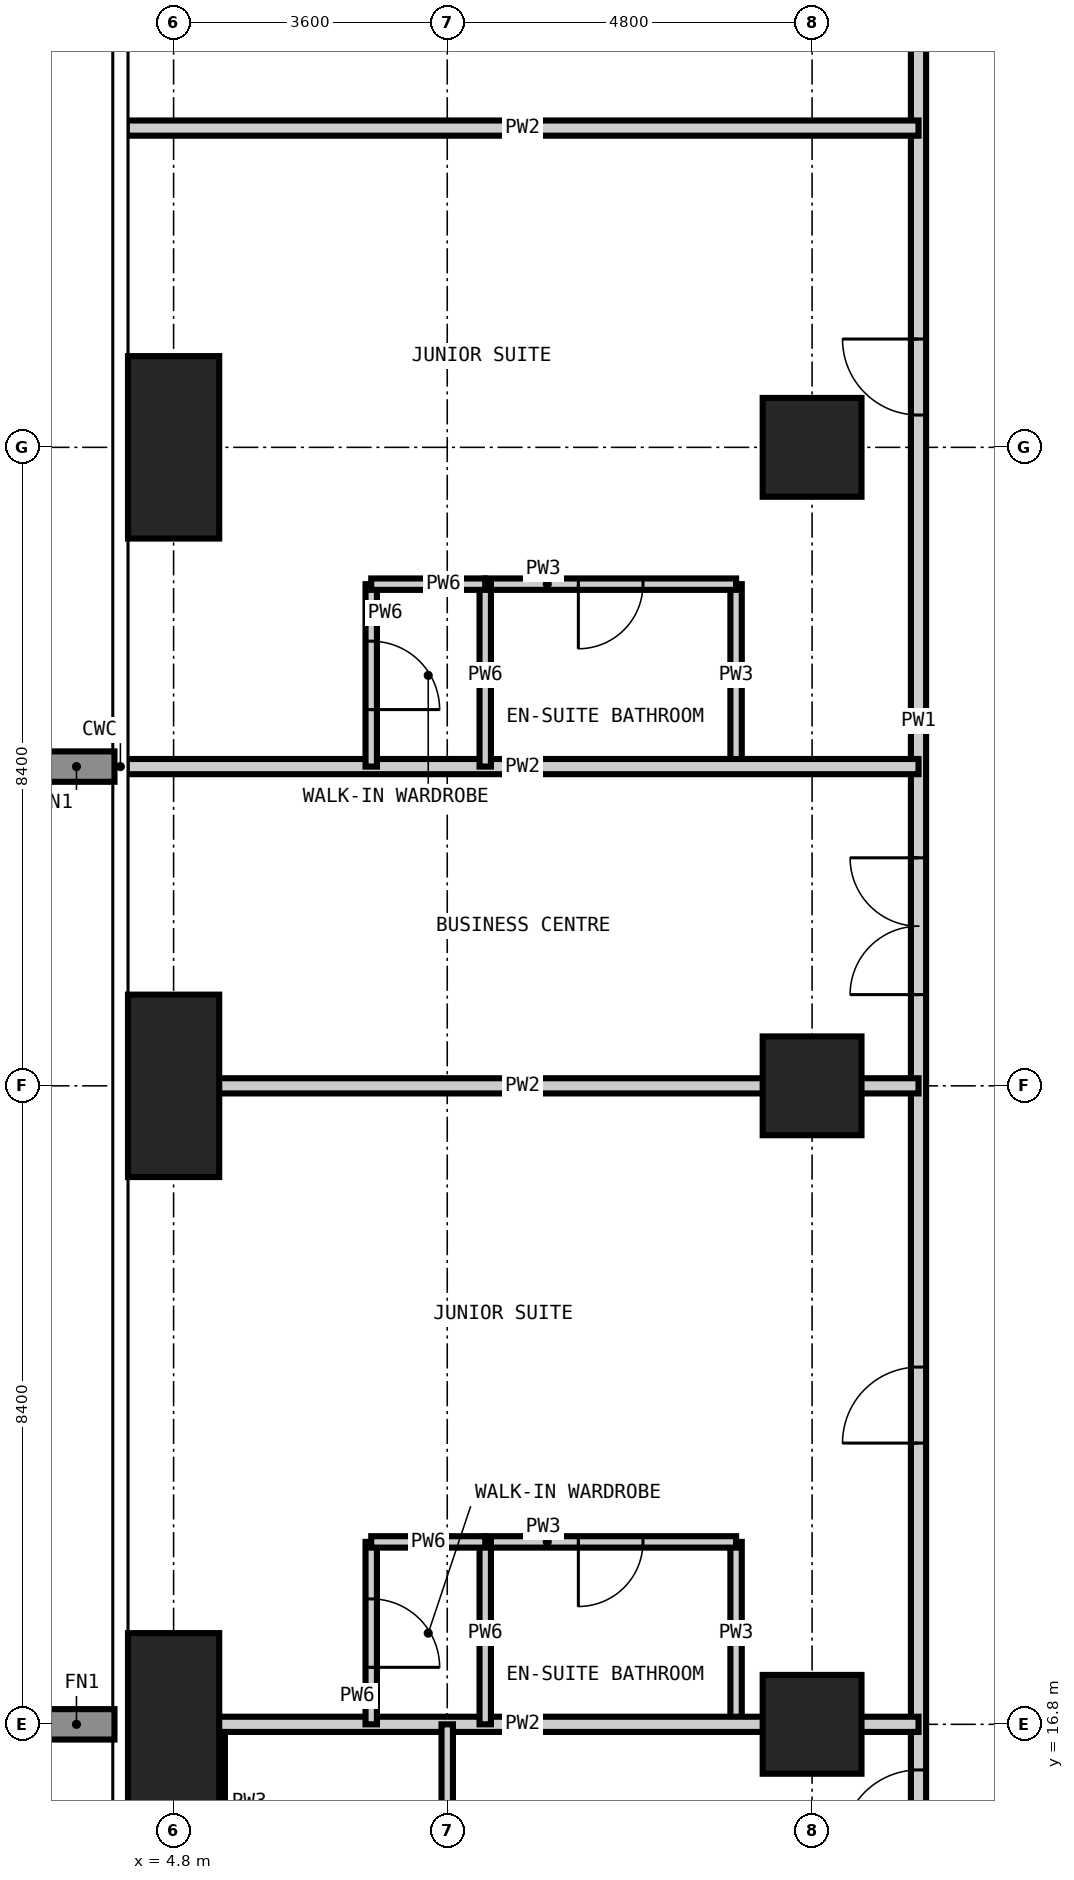
"""IFC4 building model, lengths in metres.
Left out: names, types, materials, properties, quantities, classifications, styles, units other than length and angle.
Written with IfcOpenShell. Run it as: python <this file> out.ifc"""

import sys

from ifc_helpers import new_model, si_unit, direction, frame, frame_2d, origin, origin_2d, place, context, subcontext, project, spatial, rectangle, extrude, element, fill, save


model = new_model("IFC4")
c1 = context("Model", 3, precision=1e-05, world=origin(), true_north=direction((0.0, 1.0)))
c2 = subcontext(c1, "Body", "Model", "MODEL_VIEW")
j1 = project(units=[si_unit("LENGTHUNIT", "METRE"), si_unit("PLANEANGLEUNIT", "RADIAN")], contexts=[c1])
p1 = place(None, origin())
s1 = spatial("IfcSite", under=j1, at=p1, CompositionType="ELEMENT")
p2 = place(p1, origin())
s2 = spatial("IfcBuilding", under=s1, at=p2, CompositionType="ELEMENT")
p3 = place(p2, frame((0.0, 0.0, 180.6)))
s3 = spatial("IfcBuildingStorey", under=s2, at=p3, CompositionType="ELEMENT", Elevation=180.6)
for number, where, z_axis, x_axis in (
    (1, (4.8, 16.8, -0.35), (0.0, 0.0, 1.0), (1.0, 0.0, 0.0)),
    (2, (4.8, 25.2, -0.35), (0.0, 0.0, 1.0), (1.0, 0.0, 0.0)),
    (3, (4.8, 33.6, -0.35), (0.0, 0.0, 1.0), (1.0, 0.0, 0.0)),
):
    element("IfcColumn", number, at=place(p3, frame(where, z_axis=z_axis, x_axis=x_axis)), inside=s3, PredefinedType="COLUMN", context=c2, shape_type="SweptSolid", body=[
        extrude(rectangle(XDim=1.2, YDim=2.4, at=origin_2d()), origin(), (0.0, 0.0, 1.0), 3.6),
    ])
for number, where, z_axis, x_axis in (
    (4, (13.2, 16.8, -0.35), (0.0, 0.0, 1.0), (1.0, 0.0, 0.0)),
    (5, (13.2, 25.2, -0.35), (0.0, 0.0, 1.0), (1.0, 0.0, 0.0)),
    (6, (13.2, 33.6, -0.35), (0.0, 0.0, 1.0), (1.0, 0.0, 0.0)),
):
    element("IfcColumn", number, at=place(p3, frame(where, z_axis=z_axis, x_axis=x_axis)), inside=s3, PredefinedType="COLUMN", context=c2, shape_type="SweptSolid", body=[
        extrude(rectangle(XDim=1.3, YDim=1.3, at=origin_2d()), origin(), (0.0, 0.0, 1.0), 3.6),
    ])
p4 = place(p3, frame((5.4, 13.2, 0.0), z_axis=(0.0, 0.0, 1.0), x_axis=(0.0, 1.0, 0.0)))
e7 = element("IfcWall", 7, at=p4, inside=s3, PredefinedType="PARTITIONING", context=c2, shape_type="SweptSolid", body=[
    extrude(rectangle(XDim=3.6, YDim=0.15, at=frame_2d((1.8, 0.0))), origin(), (0.0, 0.0, 1.0), 3.25),
])
p5 = place(p4, frame((1.375, 0.0, 0.0)))
e8 = element("IfcOpeningElement", 8, at=p5, cuts=e7, PredefinedType="OPENING", context=c2, shape_type="SweptSolid", body=[
    extrude(rectangle(XDim=0.85, YDim=2.1, at=frame_2d((0.425, 1.05))), frame((0.0, 0.085, 0.0), z_axis=(0.0, -1.0, 0.0), x_axis=(1.0, 0.0, 0.0)), (0.0, 0.0, 1.0), 0.17),
])
p6 = place(p3, frame((12.2, 16.8, 0.0), z_axis=(0.0, 0.0, 1.0), x_axis=(0.0, 1.0, 0.0)))
e9 = element("IfcWall", 9, at=p6, inside=s3, PredefinedType="PARTITIONING", context=c2, shape_type="SweptSolid", body=[
    extrude(rectangle(XDim=2.4, YDim=0.15, at=frame_2d((1.2, 0.0))), origin(), (0.0, 0.0, 1.0), 3.25),
])
p7 = place(p3, frame((12.2, 29.4, 0.0), z_axis=(0.0, 0.0, 1.0), x_axis=(0.0, 1.0, 0.0)))
e10 = element("IfcWall", 10, at=p7, inside=s3, PredefinedType="PARTITIONING", context=c2, shape_type="SweptSolid", body=[
    extrude(rectangle(XDim=2.4, YDim=0.15, at=frame_2d((1.2, 0.0))), origin(), (0.0, 0.0, 1.0), 3.25),
])
p8 = place(p3, frame((8.9, 19.2, 0.0), z_axis=(0.0, 0.0, 1.0), x_axis=(1.0, 0.0, 0.0)))
e11 = element("IfcWall", 11, at=p8, inside=s3, PredefinedType="PARTITIONING", context=c2, shape_type="SweptSolid", body=[
    extrude(rectangle(XDim=3.3, YDim=0.15, at=frame_2d((1.65, 0.0))), origin(), (0.0, 0.0, 1.0), 3.25),
])
p9 = place(p8, frame((1.225, 0.0, 0.0)))
e12 = element("IfcOpeningElement", 12, at=p9, cuts=e11, PredefinedType="OPENING", context=c2, shape_type="SweptSolid", body=[
    extrude(rectangle(XDim=0.85, YDim=2.1, at=frame_2d((0.425, 1.05))), frame((0.0, 0.085, 0.0), z_axis=(0.0, -1.0, 0.0), x_axis=(1.0, 0.0, 0.0)), (0.0, 0.0, 1.0), 0.17),
])
p10 = place(p3, frame((8.9, 31.8, 0.0), z_axis=(0.0, 0.0, 1.0), x_axis=(1.0, 0.0, 0.0)))
e13 = element("IfcWall", 13, at=p10, inside=s3, PredefinedType="PARTITIONING", context=c2, shape_type="SweptSolid", body=[
    extrude(rectangle(XDim=3.3, YDim=0.15, at=frame_2d((1.65, 0.0))), origin(), (0.0, 0.0, 1.0), 3.25),
])
p11 = place(p10, frame((1.225, 0.0, 0.0)))
e14 = element("IfcOpeningElement", 14, at=p11, cuts=e13, PredefinedType="OPENING", context=c2, shape_type="SweptSolid", body=[
    extrude(rectangle(XDim=0.85, YDim=2.1, at=frame_2d((0.425, 1.05))), frame((0.0, 0.085, 0.0), z_axis=(0.0, -1.0, 0.0), x_axis=(1.0, 0.0, 0.0)), (0.0, 0.0, 1.0), 0.17),
])
p12 = place(p3, frame((14.6, 14.6, 0.0), z_axis=(0.0, 0.0, 1.0), x_axis=(0.0, 1.0, 0.0)))
e15 = element("IfcWall", 15, at=p12, inside=s3, PredefinedType="PARTITIONING", context=c2, shape_type="SweptSolid", body=[
    extrude(rectangle(XDim=30.8, YDim=0.2, at=frame_2d((15.4, 0.0))), origin(), (0.0, 0.0, 1.0), 3.25),
])
p13 = place(p12, frame((5.9, 0.0, 0.0)))
e16 = element("IfcOpeningElement", 16, at=p13, cuts=e15, PredefinedType="OPENING", context=c2, shape_type="SweptSolid", body=[
    extrude(rectangle(XDim=1.0, YDim=2.2, at=frame_2d((0.5, 1.1))), frame((0.0, 0.11, 0.0), z_axis=(0.0, -1.0, 0.0), x_axis=(1.0, 0.0, 0.0)), (0.0, 0.0, 1.0), 0.22),
])
p14 = place(p12, frame((11.8, 0.0, 0.0)))
e17 = element("IfcOpeningElement", 17, at=p14, cuts=e15, PredefinedType="OPENING", context=c2, shape_type="SweptSolid", body=[
    extrude(rectangle(XDim=1.8, YDim=2.4, at=frame_2d((0.9, 1.2))), frame((0.0, 0.11, 0.0), z_axis=(0.0, -1.0, 0.0), x_axis=(1.0, 0.0, 0.0)), (0.0, 0.0, 1.0), 0.22),
])
p15 = place(p12, frame((19.425, 0.0, 0.0)))
e18 = element("IfcOpeningElement", 18, at=p15, cuts=e15, PredefinedType="OPENING", context=c2, shape_type="SweptSolid", body=[
    extrude(rectangle(XDim=1.0, YDim=2.2, at=frame_2d((0.5, 1.1))), frame((0.0, 0.11, 0.0), z_axis=(0.0, -1.0, 0.0), x_axis=(1.0, 0.0, 0.0)), (0.0, 0.0, 1.0), 0.22),
])
p16 = place(p12, frame((24.8, 0.0, 0.0)))
e19 = element("IfcOpeningElement", 19, at=p16, cuts=e15, PredefinedType="OPENING", context=c2, shape_type="SweptSolid", body=[
    extrude(rectangle(XDim=1.0, YDim=2.2, at=frame_2d((0.5, 1.1))), frame((0.0, 0.11, 0.0), z_axis=(0.0, -1.0, 0.0), x_axis=(1.0, 0.0, 0.0)), (0.0, 0.0, 1.0), 0.22),
])
p17 = place(p12, frame((0.6, 0.0, 0.0)))
e20 = element("IfcOpeningElement", 20, at=p17, cuts=e15, PredefinedType="OPENING", context=c2, shape_type="SweptSolid", body=[
    extrude(rectangle(XDim=1.0, YDim=2.2, at=frame_2d((0.5, 1.1))), frame((0.0, 0.11, 0.0), z_axis=(0.0, -1.0, 0.0), x_axis=(1.0, 0.0, 0.0)), (0.0, 0.0, 1.0), 0.22),
])
p18 = place(p12, frame((28.6, 0.0, 0.0)))
e21 = element("IfcOpeningElement", 21, at=p18, cuts=e15, PredefinedType="OPENING", context=c2, shape_type="SweptSolid", body=[
    extrude(rectangle(XDim=1.0, YDim=2.2, at=frame_2d((0.5, 1.1))), frame((0.0, 0.11, 0.0), z_axis=(0.0, -1.0, 0.0), x_axis=(1.0, 0.0, 0.0)), (0.0, 0.0, 1.0), 0.22),
])
for number, where, z_axis, x_axis in (
    (22, (4.182, 16.8, 0.0), (0.0, 0.0, 1.0), (1.0, 0.0, 0.0)),
    (23, (4.182, 25.2, 0.0), (0.0, 0.0, 1.0), (1.0, 0.0, 0.0)),
    (24, (4.182, 29.4, 0.0), (0.0, 0.0, 1.0), (1.0, 0.0, 0.0)),
    (25, (4.182, 37.8, 0.0), (0.0, 0.0, 1.0), (1.0, 0.0, 0.0)),
):
    element("IfcWall", number, at=place(p3, frame(where, z_axis=z_axis, x_axis=x_axis)), inside=s3, PredefinedType="PARTITIONING", context=c2, shape_type="SweptSolid", body=[
        extrude(rectangle(XDim=10.418, YDim=0.2, at=frame_2d((5.209, 0.0))), origin(), (0.0, 0.0, 1.0), 3.25),
    ])
p19 = place(p3, frame((7.4, 16.8, 0.0), z_axis=(0.0, 0.0, 1.0), x_axis=(0.0, 1.0, 0.0)))
e26 = element("IfcWall", 26, at=p19, inside=s3, PredefinedType="PARTITIONING", context=c2, shape_type="SweptSolid", body=[
    extrude(rectangle(XDim=2.4, YDim=0.15, at=frame_2d((1.2, 0.0))), origin(), (0.0, 0.0, 1.0), 3.25),
])
p20 = place(p19, frame((0.75, 0.0, 0.0)))
e27 = element("IfcOpeningElement", 27, at=p20, cuts=e26, PredefinedType="OPENING", context=c2, shape_type="SweptSolid", body=[
    extrude(rectangle(XDim=0.9, YDim=2.1, at=frame_2d((0.45, 1.05))), frame((0.0, 0.085, 0.0), z_axis=(0.0, -1.0, 0.0), x_axis=(1.0, 0.0, 0.0)), (0.0, 0.0, 1.0), 0.17),
])
p21 = place(p3, frame((7.4, 29.4, 0.0), z_axis=(0.0, 0.0, 1.0), x_axis=(0.0, 1.0, 0.0)))
e28 = element("IfcWall", 28, at=p21, inside=s3, PredefinedType="PARTITIONING", context=c2, shape_type="SweptSolid", body=[
    extrude(rectangle(XDim=2.4, YDim=0.15, at=frame_2d((1.2, 0.0))), origin(), (0.0, 0.0, 1.0), 3.25),
])
p22 = place(p21, frame((0.75, 0.0, 0.0)))
e29 = element("IfcOpeningElement", 29, at=p22, cuts=e28, PredefinedType="OPENING", context=c2, shape_type="SweptSolid", body=[
    extrude(rectangle(XDim=0.9, YDim=2.1, at=frame_2d((0.45, 1.05))), frame((0.0, 0.085, 0.0), z_axis=(0.0, -1.0, 0.0), x_axis=(1.0, 0.0, 0.0)), (0.0, 0.0, 1.0), 0.17),
])
p23 = place(p3, frame((8.4, 4.182, 0.0), z_axis=(0.0, 0.0, 1.0), x_axis=(0.0, 1.0, 0.0)))
e30 = element("IfcWall", 30, at=p23, inside=s3, PredefinedType="PARTITIONING", context=c2, shape_type="SweptSolid", body=[
    extrude(rectangle(XDim=12.618, YDim=0.15, at=frame_2d((6.309, 0.0))), origin(), (0.0, 0.0, 1.0), 3.25),
])
p24 = place(p23, frame((2.868, 0.0, 0.0)))
e31 = element("IfcOpeningElement", 31, at=p24, cuts=e30, PredefinedType="OPENING", context=c2, shape_type="SweptSolid", body=[
    extrude(rectangle(XDim=0.9, YDim=2.1, at=frame_2d((0.45, 1.05))), frame((0.0, 0.085, 0.0), z_axis=(0.0, -1.0, 0.0), x_axis=(1.0, 0.0, 0.0)), (0.0, 0.0, 1.0), 0.17),
])
p25 = place(p3, frame((8.9, 16.8, 0.0), z_axis=(0.0, 0.0, 1.0), x_axis=(0.0, 1.0, 0.0)))
e32 = element("IfcWall", 32, at=p25, inside=s3, PredefinedType="PARTITIONING", context=c2, shape_type="SweptSolid", body=[
    extrude(rectangle(XDim=2.4, YDim=0.15, at=frame_2d((1.2, 0.0))), origin(), (0.0, 0.0, 1.0), 3.25),
])
p26 = place(p3, frame((8.9, 29.4, 0.0), z_axis=(0.0, 0.0, 1.0), x_axis=(0.0, 1.0, 0.0)))
e33 = element("IfcWall", 33, at=p26, inside=s3, PredefinedType="PARTITIONING", context=c2, shape_type="SweptSolid", body=[
    extrude(rectangle(XDim=2.4, YDim=0.15, at=frame_2d((1.2, 0.0))), origin(), (0.0, 0.0, 1.0), 3.25),
])
for number, where, z_axis, x_axis in (
    (34, (7.4, 19.2, 0.0), (0.0, 0.0, 1.0), (1.0, 0.0, 0.0)),
    (35, (7.4, 31.8, 0.0), (0.0, 0.0, 1.0), (1.0, 0.0, 0.0)),
):
    element("IfcWall", number, at=place(p3, frame(where, z_axis=z_axis, x_axis=x_axis)), inside=s3, PredefinedType="PARTITIONING", context=c2, shape_type="SweptSolid", body=[
        extrude(rectangle(XDim=1.5, YDim=0.15, at=frame_2d((0.75, 0.0))), origin(), (0.0, 0.0, 1.0), 3.25),
    ])
p27 = place(p13, origin())
e36 = element("IfcDoor", 36, at=p27, inside=s3, OperationType="SINGLE_SWING_LEFT", PredefinedType="DOOR", context=c2, shape_type="SweptSolid", body=[
    extrude(rectangle(XDim=1.0, YDim=2.2, at=frame_2d((0.5, 1.1))), frame((0.0, 0.025, 0.0), z_axis=(0.0, -1.0, 0.0), x_axis=(1.0, 0.0, 0.0)), (0.0, 0.0, 1.0), 0.05),
])
fill(e16, e36)
p28 = place(p9, frame((0.85, 0.0, 0.0), z_axis=(0.0, 0.0, 1.0), x_axis=(-1.0, 0.0, 0.0)))
e37 = element("IfcDoor", 37, at=p28, inside=s3, OperationType="SINGLE_SWING_RIGHT", PredefinedType="DOOR", context=c2, shape_type="SweptSolid", body=[
    extrude(rectangle(XDim=0.85, YDim=2.1, at=frame_2d((0.425, 1.05))), frame((0.0, 0.025, 0.0), z_axis=(0.0, -1.0, 0.0), x_axis=(1.0, 0.0, 0.0)), (0.0, 0.0, 1.0), 0.05),
])
fill(e12, e37)
p29 = place(p20, frame((0.9, 0.0, 0.0), z_axis=(0.0, 0.0, 1.0), x_axis=(-1.0, 0.0, 0.0)))
e38 = element("IfcDoor", 38, at=p29, inside=s3, OperationType="SINGLE_SWING_RIGHT", PredefinedType="DOOR", context=c2, shape_type="SweptSolid", body=[
    extrude(rectangle(XDim=0.9, YDim=2.1, at=frame_2d((0.45, 1.05))), frame((0.0, 0.025, 0.0), z_axis=(0.0, -1.0, 0.0), x_axis=(1.0, 0.0, 0.0)), (0.0, 0.0, 1.0), 0.05),
])
fill(e27, e38)
p30 = place(p14, origin())
e39 = element("IfcDoor", 39, at=p30, inside=s3, OperationType="DOUBLE_DOOR_DOUBLE_SWING", PredefinedType="DOOR", context=c2, shape_type="SweptSolid", body=[
    extrude(rectangle(XDim=1.8, YDim=2.4, at=frame_2d((0.9, 1.2))), frame((0.0, 0.025, 0.0), z_axis=(0.0, -1.0, 0.0), x_axis=(1.0, 0.0, 0.0)), (0.0, 0.0, 1.0), 0.05),
])
fill(e17, e39)
p31 = place(p15, origin())
e40 = element("IfcDoor", 40, at=p31, inside=s3, OperationType="SINGLE_SWING_RIGHT", PredefinedType="DOOR", context=c2, shape_type="SweptSolid", body=[
    extrude(rectangle(XDim=1.0, YDim=2.2, at=frame_2d((0.5, 1.1))), frame((0.0, 0.025, 0.0), z_axis=(0.0, -1.0, 0.0), x_axis=(1.0, 0.0, 0.0)), (0.0, 0.0, 1.0), 0.05),
])
fill(e18, e40)
p32 = place(p11, frame((0.85, 0.0, 0.0), z_axis=(0.0, 0.0, 1.0), x_axis=(-1.0, 0.0, 0.0)))
e41 = element("IfcDoor", 41, at=p32, inside=s3, OperationType="SINGLE_SWING_RIGHT", PredefinedType="DOOR", context=c2, shape_type="SweptSolid", body=[
    extrude(rectangle(XDim=0.85, YDim=2.1, at=frame_2d((0.425, 1.05))), frame((0.0, 0.025, 0.0), z_axis=(0.0, -1.0, 0.0), x_axis=(1.0, 0.0, 0.0)), (0.0, 0.0, 1.0), 0.05),
])
fill(e14, e41)
p33 = place(p22, frame((0.9, 0.0, 0.0), z_axis=(0.0, 0.0, 1.0), x_axis=(-1.0, 0.0, 0.0)))
e42 = element("IfcDoor", 42, at=p33, inside=s3, OperationType="SINGLE_SWING_RIGHT", PredefinedType="DOOR", context=c2, shape_type="SweptSolid", body=[
    extrude(rectangle(XDim=0.9, YDim=2.1, at=frame_2d((0.45, 1.05))), frame((0.0, 0.025, 0.0), z_axis=(0.0, -1.0, 0.0), x_axis=(1.0, 0.0, 0.0)), (0.0, 0.0, 1.0), 0.05),
])
fill(e29, e42)
p34 = place(p17, origin())
e43 = element("IfcDoor", 43, at=p34, inside=s3, OperationType="SINGLE_SWING_LEFT", PredefinedType="DOOR", context=c2, shape_type="SweptSolid", body=[
    extrude(rectangle(XDim=1.0, YDim=2.2, at=frame_2d((0.5, 1.1))), frame((0.0, 0.025, 0.0), z_axis=(0.0, -1.0, 0.0), x_axis=(1.0, 0.0, 0.0)), (0.0, 0.0, 1.0), 0.05),
])
fill(e20, e43)
save(model, sys.argv[1])
